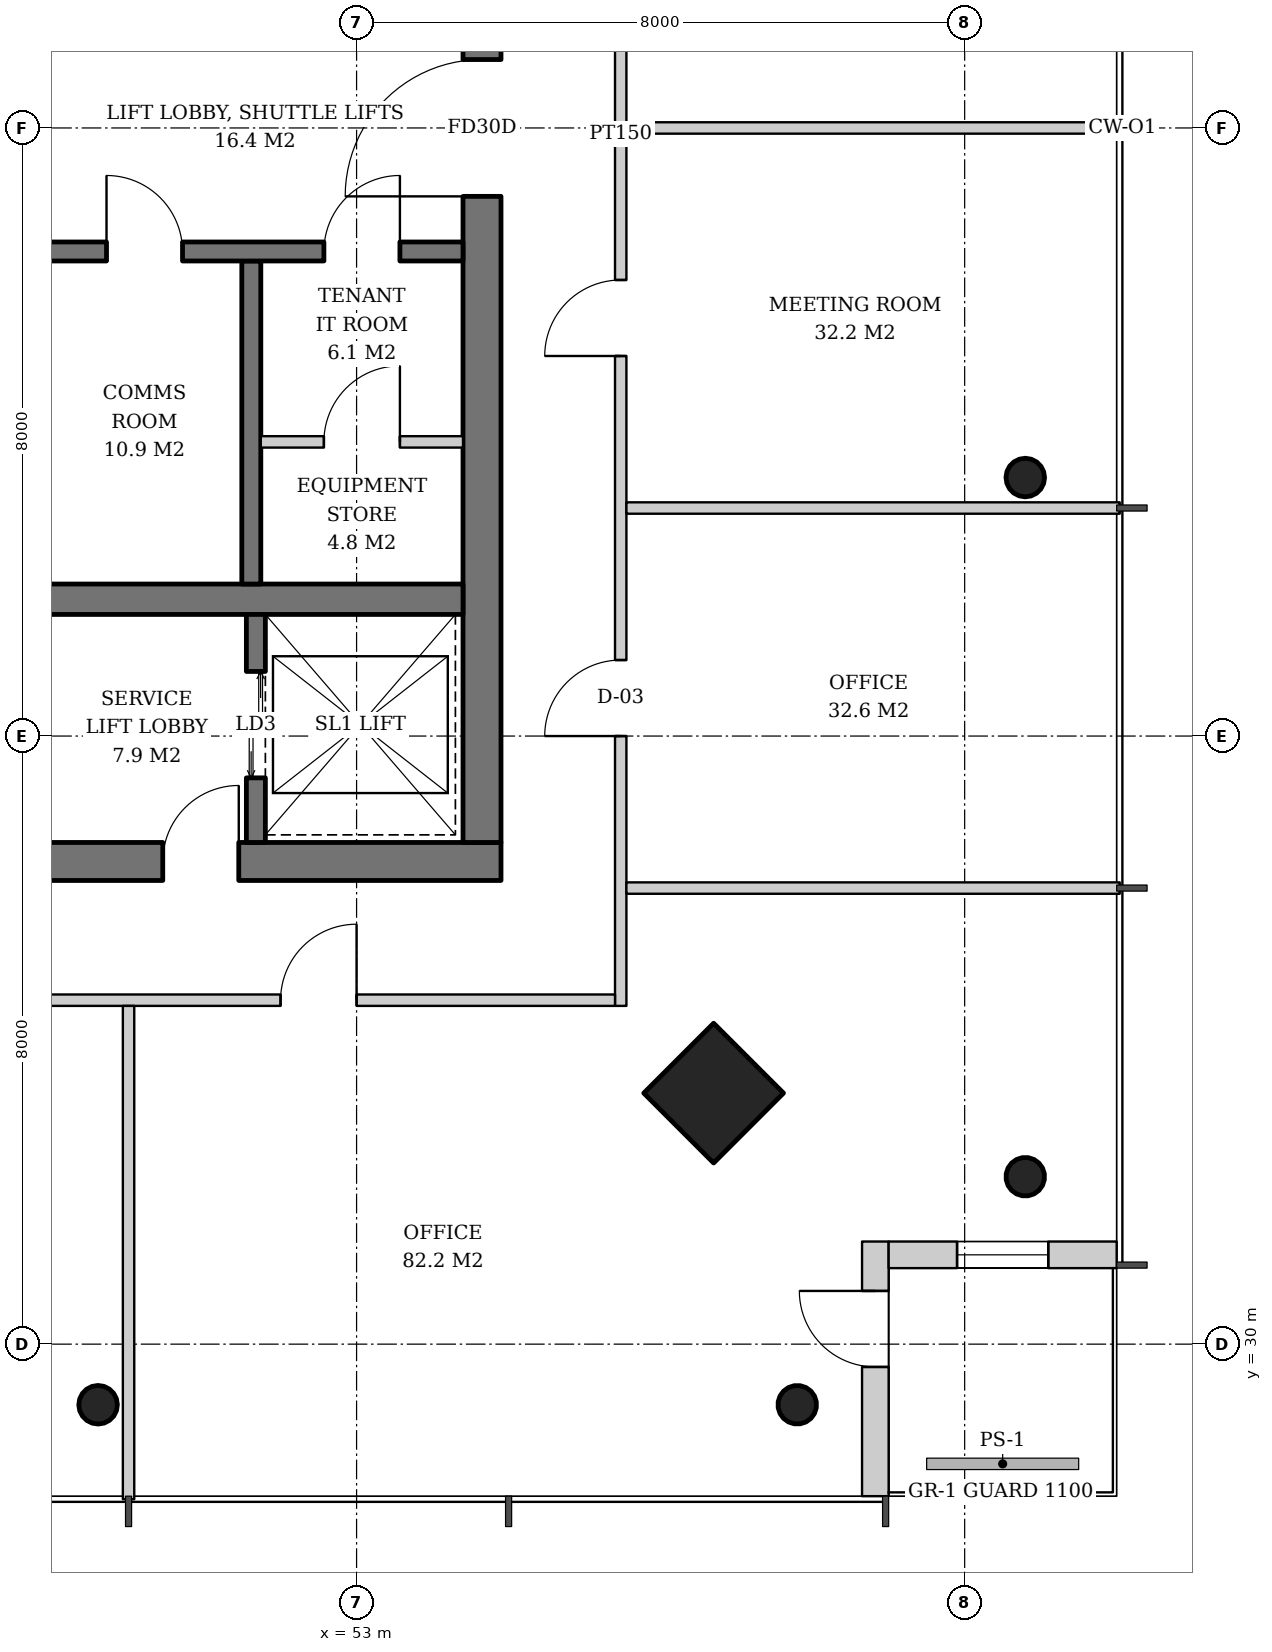
"""IFC4 building model, lengths in metres.
Left out: names, types, materials, properties, quantities, classifications, styles, units other than length and angle.
Written with IfcOpenShell. Run it as: python <this file> out.ifc"""

import sys

from ifc_helpers import new_model, si_unit, direction, frame, frame_2d, origin, origin_2d, place, context, subcontext, project, spatial, rectangle, hollow_circle, extrude, element, fill, save


model = new_model("IFC4")
c1 = context("Model", 3, precision=1e-05, world=origin(), true_north=direction((0.0, 1.0)))
c2 = subcontext(c1, "Body", "Model", "MODEL_VIEW")
j1 = project(units=[si_unit("LENGTHUNIT", "METRE"), si_unit("PLANEANGLEUNIT", "RADIAN")], contexts=[c1])
p1 = place(None, origin())
s1 = spatial("IfcSite", under=j1, at=p1, CompositionType="ELEMENT")
p2 = place(p1, origin())
s2 = spatial("IfcBuilding", under=s1, at=p2, CompositionType="ELEMENT")
p3 = place(p2, frame((0.0, 0.0, 245.2)))
s3 = spatial("IfcBuildingStorey", under=s2, at=p3, CompositionType="ELEMENT", Elevation=245.2)
p4 = place(p3, frame((61.836, 32.164, 0.0), z_axis=(-0.031898107953, 0.031898107953, 0.998981992539), x_axis=(-0.707106781187, -0.707106781187, 0.0)))
e1 = element("IfcColumn", 1, at=p4, inside=s3, PredefinedType="COLUMN", context=c2, shape_type="SweptSolid", body=[
    extrude(hollow_circle(Radius=0.254, WallThickness=0.02, at=origin_2d()), origin(), (0.0, 0.0, 1.0), 3.804),
])
p5 = place(p3, frame((61.836, 41.388, 0.0), z_axis=(-0.031912557129, 0.010594712125, 0.999434510497), x_axis=(-0.315081783451, -0.949064523485, 0.0)))
e2 = element("IfcColumn", 2, at=p5, inside=s3, PredefinedType="COLUMN", context=c2, shape_type="SweptSolid", body=[
    extrude(hollow_circle(Radius=0.254, WallThickness=0.02, at=origin_2d()), origin(), (0.0, 0.0, 1.0), 3.802),
])
p6 = place(p3, frame((57.736, 33.264, 0.0), z_axis=(-0.031898107953, 0.031898107953, 0.998981992539), x_axis=(-0.707106781187, -0.707106781187, 0.0)))
e3 = element("IfcColumn", 3, at=p6, inside=s3, PredefinedType="COLUMN", context=c2, shape_type="SweptSolid", body=[
    extrude(rectangle(XDim=1.3, YDim=1.3, at=origin_2d()), origin(), (0.0, 0.0, 1.0), 3.804),
])
p7 = place(p3, frame((58.836, 29.164, 0.0), z_axis=(-0.031898107953, 0.031898107953, 0.998981992539), x_axis=(-0.707106781187, -0.707106781187, 0.0)))
e4 = element("IfcColumn", 4, at=p7, inside=s3, PredefinedType="COLUMN", context=c2, shape_type="SweptSolid", body=[
    extrude(hollow_circle(Radius=0.254, WallThickness=0.02, at=origin_2d()), origin(), (0.0, 0.0, 1.0), 3.804),
])
p8 = place(p3, frame((49.612, 29.164, 0.0), z_axis=(-0.010594712125, 0.031912557129, 0.999434510497), x_axis=(-0.949064523485, -0.315081783451, 0.0)))
e5 = element("IfcColumn", 5, at=p8, inside=s3, PredefinedType="COLUMN", context=c2, shape_type="SweptSolid", body=[
    extrude(hollow_circle(Radius=0.254, WallThickness=0.02, at=origin_2d()), origin(), (0.0, 0.0, 1.0), 3.802),
])
p9 = place(p3, frame((35.1, 36.35, 0.0), z_axis=(0.0, 0.0, 1.0), x_axis=(1.0, 0.0, 0.0)))
e6 = element("IfcWall", 6, at=p9, inside=s3, PredefinedType="SHEAR", context=c2, shape_type="SweptSolid", body=[
    extrude(rectangle(XDim=19.8, YDim=0.5, at=frame_2d((9.9, 0.0))), origin(), (0.0, 0.0, 1.0), 3.8),
])
p10 = place(p9, frame((3.9, 0.0, 0.0)))
e7 = element("IfcOpeningElement", 7, at=p10, cuts=e6, PredefinedType="OPENING", context=c2, shape_type="SweptSolid", body=[
    extrude(rectangle(XDim=1.0, YDim=2.1, at=frame_2d((0.5, 1.05))), frame((0.0, 0.26, 0.0), z_axis=(0.0, -1.0, 0.0), x_axis=(1.0, 0.0, 0.0)), (0.0, 0.0, 1.0), 0.52),
])
p11 = place(p9, frame((15.35, 0.0, 0.0)))
e8 = element("IfcOpeningElement", 8, at=p11, cuts=e6, PredefinedType="OPENING", context=c2, shape_type="SweptSolid", body=[
    extrude(rectangle(XDim=1.0, YDim=2.1, at=frame_2d((0.5, 1.05))), frame((0.0, 0.26, 0.0), z_axis=(0.0, -1.0, 0.0), x_axis=(1.0, 0.0, 0.0)), (0.0, 0.0, 1.0), 0.52),
])
p12 = place(p3, frame((54.65, 36.6, 0.0), z_axis=(0.0, 0.0, 1.0), x_axis=(0.0, 1.0, 0.0)))
e9 = element("IfcWall", 9, at=p12, inside=s3, PredefinedType="SHEAR", context=c2, shape_type="SweptSolid", body=[
    extrude(rectangle(XDim=18.8, YDim=0.5, at=frame_2d((9.4, 0.0))), origin(), (0.0, 0.0, 1.0), 3.8),
])
p13 = place(p12, frame((8.5, 0.0, 0.0)))
e10 = element("IfcOpeningElement", 10, at=p13, cuts=e9, PredefinedType="OPENING", context=c2, shape_type="SweptSolid", body=[
    extrude(rectangle(XDim=1.8, YDim=2.4, at=frame_2d((0.9, 1.2))), frame((0.0, 0.26, 0.0), z_axis=(0.0, -1.0, 0.0), x_axis=(1.0, 0.0, 0.0)), (0.0, 0.0, 1.0), 0.52),
])
p14 = place(p3, frame((35.6, 39.8, 0.0), z_axis=(0.0, 0.0, 1.0), x_axis=(1.0, 0.0, 0.0)))
e11 = element("IfcWall", 11, at=p14, inside=s3, PredefinedType="SHEAR", context=c2, shape_type="SweptSolid", body=[
    extrude(rectangle(XDim=18.8, YDim=0.4, at=frame_2d((9.4, 0.0))), origin(), (0.0, 0.0, 1.0), 3.8),
])
p15 = place(p3, frame((59.825, 28.0, 0.0), z_axis=(0.0, 0.0, 1.0), x_axis=(0.0, 1.0, 0.0)))
e12 = element("IfcWall", 12, at=p15, inside=s3, PredefinedType="SOLIDWALL", context=c2, shape_type="SweptSolid", body=[
    extrude(rectangle(XDim=3.35, YDim=0.35, at=frame_2d((1.675, 0.0))), origin(), (0.0, 0.0, 1.0), 3.62),
])
p16 = place(p15, frame((1.7, 0.0, 0.0)))
e13 = element("IfcOpeningElement", 13, at=p16, cuts=e12, PredefinedType="OPENING", context=c2, shape_type="SweptSolid", body=[
    extrude(rectangle(XDim=1.0, YDim=2.4, at=frame_2d((0.5, 1.2))), frame((0.0, 0.185, 0.0), z_axis=(0.0, -1.0, 0.0), x_axis=(1.0, 0.0, 0.0)), (0.0, 0.0, 1.0), 0.37),
])
p17 = place(p3, frame((60.0, 31.175, 0.0), z_axis=(0.0, 0.0, 1.0), x_axis=(1.0, 0.0, 0.0)))
e14 = element("IfcWall", 14, at=p17, inside=s3, PredefinedType="SOLIDWALL", context=c2, shape_type="SweptSolid", body=[
    extrude(rectangle(XDim=3.0, YDim=0.35, at=frame_2d((1.5, 0.0))), origin(), (0.0, 0.0, 1.0), 3.62),
])
p18 = place(p17, frame((0.9, 0.0, 0.6)))
e15 = element("IfcOpeningElement", 15, at=p18, cuts=e14, PredefinedType="OPENING", context=c2, shape_type="SweptSolid", body=[
    extrude(rectangle(XDim=1.2, YDim=2.55, at=frame_2d((0.6, 1.275))), frame((0.0, 0.185, 0.0), z_axis=(0.0, -1.0, 0.0), x_axis=(1.0, 0.0, 0.0)), (0.0, 0.0, 1.0), 0.37),
])
p19 = place(p3, frame((51.675, 36.6, 0.0), z_axis=(0.0, 0.0, 1.0), x_axis=(0.0, 1.0, 0.0)))
e16 = element("IfcWall", 16, at=p19, inside=s3, PredefinedType="SHEAR", context=c2, shape_type="SweptSolid", body=[
    extrude(rectangle(XDim=3.0, YDim=0.25, at=frame_2d((1.5, 0.0))), origin(), (0.0, 0.0, 1.0), 3.8),
])
p20 = place(p19, frame((0.85, 0.0, 0.0)))
e17 = element("IfcOpeningElement", 17, at=p20, cuts=e16, PredefinedType="OPENING", context=c2, shape_type="SweptSolid", body=[
    extrude(rectangle(XDim=1.4, YDim=2.4, at=frame_2d((0.7, 1.2))), frame((0.0, 0.135, 0.0), z_axis=(0.0, -1.0, 0.0), x_axis=(1.0, 0.0, 0.0)), (0.0, 0.0, 1.0), 0.27),
])
p21 = place(p3, frame((51.615, 44.25, 0.0), z_axis=(0.0, 0.0, 1.0), x_axis=(0.0, -1.0, 0.0)))
e18 = element("IfcWall", 18, at=p21, inside=s3, PredefinedType="SHEAR", context=c2, shape_type="SweptSolid", body=[
    extrude(rectangle(XDim=4.25, YDim=0.25, at=frame_2d((2.125, 0.0))), origin(), (0.0, 0.0, 1.0), 3.8),
])
p22 = place(p3, frame((48.93, 44.375, 0.0), z_axis=(0.0, 0.0, 1.0), x_axis=(1.0, 0.0, 0.0)))
e19 = element("IfcWall", 19, at=p22, inside=s3, PredefinedType="SHEAR", context=c2, shape_type="SweptSolid", body=[
    extrude(rectangle(XDim=5.47, YDim=0.25, at=frame_2d((2.735, 0.0))), origin(), (0.0, 0.0, 1.0), 3.8),
])
p23 = place(p22, frame((0.78, 0.0, 0.0)))
e20 = element("IfcOpeningElement", 20, at=p23, cuts=e19, PredefinedType="OPENING", context=c2, shape_type="SweptSolid", body=[
    extrude(rectangle(XDim=1.0, YDim=2.1, at=frame_2d((0.5, 1.05))), frame((0.0, 0.135, 0.0), z_axis=(0.0, -1.0, 0.0), x_axis=(1.0, 0.0, 0.0)), (0.0, 0.0, 1.0), 0.27),
])
p24 = place(p22, frame((3.64, 0.0, 0.0)))
e21 = element("IfcOpeningElement", 21, at=p24, cuts=e19, PredefinedType="OPENING", context=c2, shape_type="SweptSolid", body=[
    extrude(rectangle(XDim=1.0, YDim=2.1, at=frame_2d((0.5, 1.05))), frame((0.0, 0.135, 0.0), z_axis=(0.0, -1.0, 0.0), x_axis=(1.0, 0.0, 0.0)), (0.0, 0.0, 1.0), 0.27),
])
p25 = place(p3, frame((51.74, 41.87, 0.0), z_axis=(0.0, 0.0, 1.0), x_axis=(1.0, 0.0, 0.0)))
e22 = element("IfcWall", 22, at=p25, inside=s3, PredefinedType="SOLIDWALL", context=c2, shape_type="SweptSolid", body=[
    extrude(rectangle(XDim=2.66, YDim=0.15, at=frame_2d((1.33, 0.0))), origin(), (0.0, 0.0, 1.0), 3.62),
])
p26 = place(p25, frame((0.83, 0.0, 0.0)))
e23 = element("IfcOpeningElement", 23, at=p26, cuts=e22, PredefinedType="OPENING", context=c2, shape_type="SweptSolid", body=[
    extrude(rectangle(XDim=1.0, YDim=2.1, at=frame_2d((0.5, 1.05))), frame((0.0, 0.085, 0.0), z_axis=(0.0, -1.0, 0.0), x_axis=(1.0, 0.0, 0.0)), (0.0, 0.0, 1.0), 0.17),
])
p27 = place(p3, frame((56.475, 34.45, 0.0), z_axis=(0.0, 0.0, 1.0), x_axis=(0.0, 1.0, 0.0)))
e24 = element("IfcWall", 24, at=p27, inside=s3, PredefinedType="PARTITIONING", context=c2, shape_type="SweptSolid", body=[
    extrude(rectangle(XDim=22.95, YDim=0.15, at=frame_2d((11.475, 0.0))), origin(), (0.0, 0.0, 1.0), 3.02),
])
p28 = place(p27, frame((3.55, 0.0, 0.0)))
e25 = element("IfcOpeningElement", 25, at=p28, cuts=e24, PredefinedType="OPENING", context=c2, shape_type="SweptSolid", body=[
    extrude(rectangle(XDim=1.0, YDim=2.1, at=frame_2d((0.5, 1.05))), frame((0.0, 0.085, 0.0), z_axis=(0.0, -1.0, 0.0), x_axis=(1.0, 0.0, 0.0)), (0.0, 0.0, 1.0), 0.17),
])
p29 = place(p27, frame((8.55, 0.0, 0.0)))
e26 = element("IfcOpeningElement", 26, at=p29, cuts=e24, PredefinedType="OPENING", context=c2, shape_type="SweptSolid", body=[
    extrude(rectangle(XDim=1.0, YDim=2.1, at=frame_2d((0.5, 1.05))), frame((0.0, 0.085, 0.0), z_axis=(0.0, -1.0, 0.0), x_axis=(1.0, 0.0, 0.0)), (0.0, 0.0, 1.0), 0.17),
])
p30 = place(p27, frame((13.55, 0.0, 0.0)))
e27 = element("IfcOpeningElement", 27, at=p30, cuts=e24, PredefinedType="OPENING", context=c2, shape_type="SweptSolid", body=[
    extrude(rectangle(XDim=1.0, YDim=2.1, at=frame_2d((0.5, 1.05))), frame((0.0, 0.085, 0.0), z_axis=(0.0, -1.0, 0.0), x_axis=(1.0, 0.0, 0.0)), (0.0, 0.0, 1.0), 0.17),
])
p31 = place(p27, frame((18.55, 0.0, 0.0)))
e28 = element("IfcOpeningElement", 28, at=p31, cuts=e24, PredefinedType="OPENING", context=c2, shape_type="SweptSolid", body=[
    extrude(rectangle(XDim=1.0, YDim=2.1, at=frame_2d((0.5, 1.05))), frame((0.0, 0.085, 0.0), z_axis=(0.0, -1.0, 0.0), x_axis=(1.0, 0.0, 0.0)), (0.0, 0.0, 1.0), 0.17),
])
for number, where, z_axis, x_axis in (
    (29, (56.55, 36.0, 0.0), (0.0, 0.0, 1.0), (1.0, 0.0, 0.0)),
    (30, (56.55, 41.0, 0.0), (0.0, 0.0, 1.0), (1.0, 0.0, 0.0)),
    (31, (56.55, 46.0, 0.0), (0.0, 0.0, 1.0), (1.0, 0.0, 0.0)),
):
    element("IfcWall", number, at=place(p3, frame(where, z_axis=z_axis, x_axis=x_axis)), inside=s3, PredefinedType="PARTITIONING", context=c2, shape_type="SweptSolid", body=[
        extrude(rectangle(XDim=6.49, YDim=0.15, at=frame_2d((3.245, 0.0))), origin(), (0.0, 0.0, 1.0), 3.12),
    ])
p32 = place(p3, frame((33.45, 34.525, 0.0), z_axis=(0.0, 0.0, 1.0), x_axis=(1.0, 0.0, 0.0)))
e32 = element("IfcWall", 32, at=p32, inside=s3, PredefinedType="PARTITIONING", context=c2, shape_type="SweptSolid", body=[
    extrude(rectangle(XDim=22.95, YDim=0.15, at=frame_2d((11.475, 0.0))), origin(), (0.0, 0.0, 1.0), 3.02),
])
p33 = place(p32, frame((3.55, 0.0, 0.0)))
e33 = element("IfcOpeningElement", 33, at=p33, cuts=e32, PredefinedType="OPENING", context=c2, shape_type="SweptSolid", body=[
    extrude(rectangle(XDim=1.0, YDim=2.1, at=frame_2d((0.5, 1.05))), frame((0.0, 0.085, 0.0), z_axis=(0.0, -1.0, 0.0), x_axis=(1.0, 0.0, 0.0)), (0.0, 0.0, 1.0), 0.17),
])
p34 = place(p32, frame((8.55, 0.0, 0.0)))
e34 = element("IfcOpeningElement", 34, at=p34, cuts=e32, PredefinedType="OPENING", context=c2, shape_type="SweptSolid", body=[
    extrude(rectangle(XDim=1.0, YDim=2.1, at=frame_2d((0.5, 1.05))), frame((0.0, 0.085, 0.0), z_axis=(0.0, -1.0, 0.0), x_axis=(1.0, 0.0, 0.0)), (0.0, 0.0, 1.0), 0.17),
])
p35 = place(p32, frame((13.55, 0.0, 0.0)))
e35 = element("IfcOpeningElement", 35, at=p35, cuts=e32, PredefinedType="OPENING", context=c2, shape_type="SweptSolid", body=[
    extrude(rectangle(XDim=1.0, YDim=2.1, at=frame_2d((0.5, 1.05))), frame((0.0, 0.085, 0.0), z_axis=(0.0, -1.0, 0.0), x_axis=(1.0, 0.0, 0.0)), (0.0, 0.0, 1.0), 0.17),
])
p36 = place(p32, frame((18.55, 0.0, 0.0)))
e36 = element("IfcOpeningElement", 36, at=p36, cuts=e32, PredefinedType="OPENING", context=c2, shape_type="SweptSolid", body=[
    extrude(rectangle(XDim=1.0, YDim=2.1, at=frame_2d((0.5, 1.05))), frame((0.0, 0.085, 0.0), z_axis=(0.0, -1.0, 0.0), x_axis=(1.0, 0.0, 0.0)), (0.0, 0.0, 1.0), 0.17),
])
p37 = place(p3, frame((50.0, 34.45, 0.0), z_axis=(0.0, 0.0, 1.0), x_axis=(0.0, -1.0, 0.0)))
e37 = element("IfcWall", 37, at=p37, inside=s3, PredefinedType="PARTITIONING", context=c2, shape_type="SweptSolid", body=[
    extrude(rectangle(XDim=6.49, YDim=0.15, at=frame_2d((3.245, 0.0))), origin(), (0.0, 0.0, 1.0), 3.12),
])
p38 = place(p16, origin())
e38 = element("IfcDoor", 38, at=p38, inside=s3, OperationType="SINGLE_SWING_RIGHT", PredefinedType="DOOR", context=c2, shape_type="SweptSolid", body=[
    extrude(rectangle(XDim=1.0, YDim=2.4, at=frame_2d((0.5, 1.2))), frame((0.0, 0.025, 0.0), z_axis=(0.0, -1.0, 0.0), x_axis=(1.0, 0.0, 0.0)), (0.0, 0.0, 1.0), 0.05),
])
fill(e13, e38)
p39 = place(p18, origin())
e39 = element("IfcWindow", 39, at=p39, inside=s3, PartitioningType="SINGLE_PANEL", PredefinedType="WINDOW", context=c2, shape_type="SweptSolid", body=[
    extrude(rectangle(XDim=1.2, YDim=2.55, at=frame_2d((0.6, 1.275))), frame((0.0, 0.03, 0.0), z_axis=(0.0, -1.0, 0.0), x_axis=(1.0, 0.0, 0.0)), (0.0, 0.0, 1.0), 0.06),
])
fill(e15, e39)
p40 = place(p20, origin())
e40 = element("IfcDoor", 40, at=p40, inside=s3, OperationType="DOUBLE_DOOR_SLIDING", PredefinedType="DOOR", context=c2, shape_type="SweptSolid", body=[
    extrude(rectangle(XDim=1.4, YDim=2.4, at=frame_2d((0.7, 1.2))), frame((0.0, 0.025, 0.0), z_axis=(0.0, -1.0, 0.0), x_axis=(1.0, 0.0, 0.0)), (0.0, 0.0, 1.0), 0.05),
])
fill(e17, e40)
p41 = place(p23, origin())
e41 = element("IfcDoor", 41, at=p41, inside=s3, OperationType="SINGLE_SWING_LEFT", PredefinedType="DOOR", context=c2, shape_type="SweptSolid", body=[
    extrude(rectangle(XDim=1.0, YDim=2.1, at=frame_2d((0.5, 1.05))), frame((0.0, 0.025, 0.0), z_axis=(0.0, -1.0, 0.0), x_axis=(1.0, 0.0, 0.0)), (0.0, 0.0, 1.0), 0.05),
])
fill(e20, e41)
p42 = place(p24, origin())
e42 = element("IfcDoor", 42, at=p42, inside=s3, OperationType="SINGLE_SWING_RIGHT", PredefinedType="DOOR", context=c2, shape_type="SweptSolid", body=[
    extrude(rectangle(XDim=1.0, YDim=2.1, at=frame_2d((0.5, 1.05))), frame((0.0, 0.025, 0.0), z_axis=(0.0, -1.0, 0.0), x_axis=(1.0, 0.0, 0.0)), (0.0, 0.0, 1.0), 0.05),
])
fill(e21, e42)
p43 = place(p26, origin())
e43 = element("IfcDoor", 43, at=p43, inside=s3, OperationType="SINGLE_SWING_RIGHT", PredefinedType="DOOR", context=c2, shape_type="SweptSolid", body=[
    extrude(rectangle(XDim=1.0, YDim=2.1, at=frame_2d((0.5, 1.05))), frame((0.0, 0.025, 0.0), z_axis=(0.0, -1.0, 0.0), x_axis=(1.0, 0.0, 0.0)), (0.0, 0.0, 1.0), 0.05),
])
fill(e23, e43)
p44 = place(p13, origin())
e44 = element("IfcDoor", 44, at=p44, inside=s3, OperationType="DOUBLE_DOOR_SINGLE_SWING", PredefinedType="DOOR", context=c2, shape_type="SweptSolid", body=[
    extrude(rectangle(XDim=1.8, YDim=2.4, at=frame_2d((0.9, 1.2))), frame((0.0, 0.025, 0.0), z_axis=(0.0, -1.0, 0.0), x_axis=(1.0, 0.0, 0.0)), (0.0, 0.0, 1.0), 0.05),
])
fill(e10, e44)
p45 = place(p11, origin())
e45 = element("IfcDoor", 45, at=p45, inside=s3, OperationType="SINGLE_SWING_RIGHT", PredefinedType="DOOR", context=c2, shape_type="SweptSolid", body=[
    extrude(rectangle(XDim=1.0, YDim=2.1, at=frame_2d((0.5, 1.05))), frame((0.0, 0.025, 0.0), z_axis=(0.0, -1.0, 0.0), x_axis=(1.0, 0.0, 0.0)), (0.0, 0.0, 1.0), 0.05),
])
fill(e8, e45)
p46 = place(p28, origin())
e46 = element("IfcDoor", 46, at=p46, inside=s3, OperationType="SINGLE_SWING_LEFT", PredefinedType="DOOR", context=c2, shape_type="SweptSolid", body=[
    extrude(rectangle(XDim=1.0, YDim=2.1, at=frame_2d((0.5, 1.05))), frame((0.0, 0.025, 0.0), z_axis=(0.0, -1.0, 0.0), x_axis=(1.0, 0.0, 0.0)), (0.0, 0.0, 1.0), 0.05),
])
fill(e25, e46)
p47 = place(p29, origin())
e47 = element("IfcDoor", 47, at=p47, inside=s3, OperationType="SINGLE_SWING_LEFT", PredefinedType="DOOR", context=c2, shape_type="SweptSolid", body=[
    extrude(rectangle(XDim=1.0, YDim=2.1, at=frame_2d((0.5, 1.05))), frame((0.0, 0.025, 0.0), z_axis=(0.0, -1.0, 0.0), x_axis=(1.0, 0.0, 0.0)), (0.0, 0.0, 1.0), 0.05),
])
fill(e26, e47)
p48 = place(p36, origin())
e48 = element("IfcDoor", 48, at=p48, inside=s3, OperationType="SINGLE_SWING_RIGHT", PredefinedType="DOOR", context=c2, shape_type="SweptSolid", body=[
    extrude(rectangle(XDim=1.0, YDim=2.1, at=frame_2d((0.5, 1.05))), frame((0.0, 0.025, 0.0), z_axis=(0.0, -1.0, 0.0), x_axis=(1.0, 0.0, 0.0)), (0.0, 0.0, 1.0), 0.05),
])
fill(e36, e48)
save(model, sys.argv[1])
